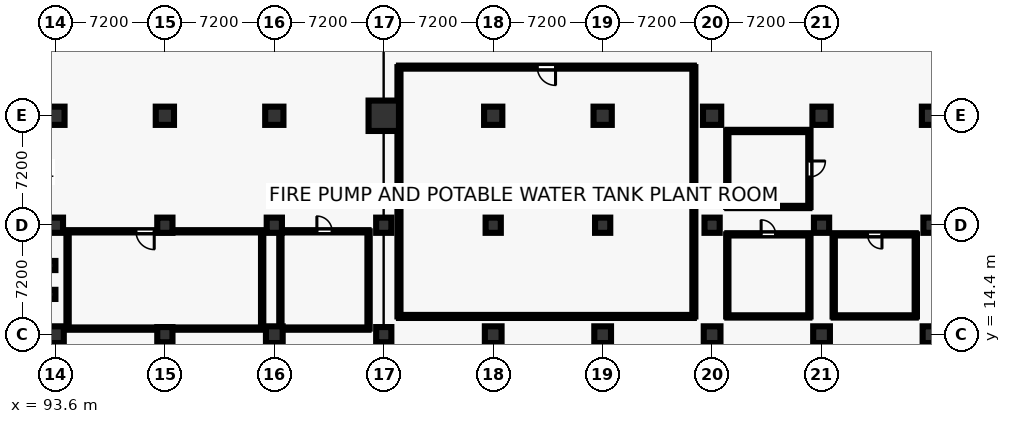
"""IFC4 building model, lengths in metres.
Left out: names, types, materials, properties, quantities, classifications, styles, units other than length and angle.
Written with IfcOpenShell. Run it as: python <this file> out.ifc"""

import sys

from ifc_helpers import new_model, si_unit, direction, frame, frame_2d, origin, origin_2d, place, context, subcontext, project, spatial, rectangle, circle, extrude, element, fill, save


model = new_model("IFC4")
c1 = context("Model", 3, precision=1e-05, world=origin(), true_north=direction((0.0, 1.0)))
c2 = subcontext(c1, "Body", "Model", "MODEL_VIEW")
j1 = project(units=[si_unit("LENGTHUNIT", "METRE"), si_unit("PLANEANGLEUNIT", "RADIAN")], contexts=[c1])
p1 = place(None, origin())
s1 = spatial("IfcSite", under=j1, at=p1, CompositionType="ELEMENT")
p2 = place(p1, origin())
s2 = spatial("IfcBuilding", under=s1, at=p2, CompositionType="ELEMENT")
p3 = place(p2, frame((0.0, 0.0, -5.4)))
s3 = spatial("IfcBuildingStorey", under=s2, at=p3, CompositionType="ELEMENT", Elevation=-5.4)
p4 = place(p3, frame((93.6, 14.4, 0.0), z_axis=(0.0, 0.0, 1.0), x_axis=(1.0, 0.0, 0.0)))
e1 = element("IfcColumn", 1, at=p4, inside=s3, PredefinedType="COLUMN", context=c2, shape_type="SweptSolid", body=[
    extrude(rectangle(XDim=1.1, YDim=1.1, at=origin_2d()), origin(), (0.0, 0.0, 1.0), 5.4),
])
p5 = place(p3, frame((93.6, 21.6, 0.0), z_axis=(0.0, 0.0, 1.0), x_axis=(1.0, 0.0, 0.0)))
e2 = element("IfcColumn", 2, at=p5, inside=s3, PredefinedType="COLUMN", context=c2, shape_type="SweptSolid", body=[
    extrude(rectangle(XDim=1.0, YDim=1.0, at=origin_2d()), origin(), (0.0, 0.0, 1.0), 5.4),
])
p6 = place(p3, frame((93.6, 28.8, 0.0), z_axis=(0.0, 0.0, 1.0), x_axis=(1.0, 0.0, 0.0)))
e3 = element("IfcColumn", 3, at=p6, inside=s3, PredefinedType="COLUMN", context=c2, shape_type="SweptSolid", body=[
    extrude(circle(Radius=0.6, at=origin_2d()), origin(), (0.0, 0.0, 1.0), 5.4),
])
p7 = place(p3, frame((100.8, 14.4, 0.0), z_axis=(0.0, 0.0, 1.0), x_axis=(1.0, 0.0, 0.0)))
e4 = element("IfcColumn", 4, at=p7, inside=s3, PredefinedType="COLUMN", context=c2, shape_type="SweptSolid", body=[
    extrude(circle(Radius=0.5, at=origin_2d()), origin(), (0.0, 0.0, 1.0), 5.4),
])
p8 = place(p3, frame((100.8, 21.6, 0.0), z_axis=(0.0, 0.0, 1.0), x_axis=(1.0, 0.0, 0.0)))
e5 = element("IfcColumn", 5, at=p8, inside=s3, PredefinedType="COLUMN", context=c2, shape_type="SweptSolid", body=[
    extrude(rectangle(XDim=1.0, YDim=1.0, at=origin_2d()), origin(), (0.0, 0.0, 1.0), 5.4),
])
p9 = place(p3, frame((100.8, 28.8, 0.0), z_axis=(0.0, 0.0, 1.0), x_axis=(1.0, 0.0, 0.0)))
e6 = element("IfcColumn", 6, at=p9, inside=s3, PredefinedType="COLUMN", context=c2, shape_type="SweptSolid", body=[
    extrude(circle(Radius=0.6, at=origin_2d()), origin(), (0.0, 0.0, 1.0), 5.4),
])
p10 = place(p3, frame((108.0, 14.4, 0.0), z_axis=(0.0, 0.0, 1.0), x_axis=(1.0, 0.0, 0.0)))
e7 = element("IfcColumn", 7, at=p10, inside=s3, PredefinedType="COLUMN", context=c2, shape_type="SweptSolid", body=[
    extrude(rectangle(XDim=1.1, YDim=1.1, at=origin_2d()), origin(), (0.0, 0.0, 1.0), 5.4),
])
p11 = place(p3, frame((108.0, 21.6, 0.0), z_axis=(0.0, 0.0, 1.0), x_axis=(1.0, 0.0, 0.0)))
e8 = element("IfcColumn", 8, at=p11, inside=s3, PredefinedType="COLUMN", context=c2, shape_type="SweptSolid", body=[
    extrude(rectangle(XDim=1.0, YDim=1.0, at=origin_2d()), origin(), (0.0, 0.0, 1.0), 5.4),
])
p12 = place(p3, frame((108.0, 28.8, 0.0), z_axis=(0.0, 0.0, 1.0), x_axis=(1.0, 0.0, 0.0)))
e9 = element("IfcColumn", 9, at=p12, inside=s3, PredefinedType="COLUMN", context=c2, shape_type="SweptSolid", body=[
    extrude(circle(Radius=0.6, at=origin_2d()), origin(), (0.0, 0.0, 1.0), 5.4),
])
for number, where, z_axis, x_axis in (
    (10, (115.2, 14.4, 0.0), (0.0, 0.0, 1.0), (1.0, 0.0, 0.0)),
    (11, (115.2, 21.6, 0.0), (0.0, 0.0, 1.0), (1.0, 0.0, 0.0)),
):
    element("IfcColumn", number, at=place(p3, frame(where, z_axis=z_axis, x_axis=x_axis)), inside=s3, PredefinedType="COLUMN", context=c2, shape_type="SweptSolid", body=[
        extrude(circle(Radius=0.5, at=origin_2d()), origin(), (0.0, 0.0, 1.0), 5.4),
    ])
p13 = place(p3, frame((115.2, 28.8, 0.0), z_axis=(0.0, 0.0, 1.0), x_axis=(1.0, 0.0, 0.0)))
e12 = element("IfcColumn", 12, at=p13, inside=s3, PredefinedType="COLUMN", context=c2, shape_type="SweptSolid", body=[
    extrude(circle(Radius=1.0, at=origin_2d()), origin(), (0.0, 0.0, 1.0), 5.4),
])
p14 = place(p3, frame((122.4, 14.4, 0.0), z_axis=(0.0, 0.0, 1.0), x_axis=(1.0, 0.0, 0.0)))
e13 = element("IfcColumn", 13, at=p14, inside=s3, PredefinedType="COLUMN", context=c2, shape_type="SweptSolid", body=[
    extrude(rectangle(XDim=1.1, YDim=1.1, at=origin_2d()), origin(), (0.0, 0.0, 1.0), 5.4),
])
p15 = place(p3, frame((122.4, 21.6, 0.0), z_axis=(0.0, 0.0, 1.0), x_axis=(1.0, 0.0, 0.0)))
e14 = element("IfcColumn", 14, at=p15, inside=s3, PredefinedType="COLUMN", context=c2, shape_type="SweptSolid", body=[
    extrude(rectangle(XDim=1.0, YDim=1.0, at=origin_2d()), origin(), (0.0, 0.0, 1.0), 5.4),
])
p16 = place(p3, frame((122.4, 28.8, 0.0), z_axis=(0.0, 0.0, 1.0), x_axis=(1.0, 0.0, 0.0)))
e15 = element("IfcColumn", 15, at=p16, inside=s3, PredefinedType="COLUMN", context=c2, shape_type="SweptSolid", body=[
    extrude(circle(Radius=0.6, at=origin_2d()), origin(), (0.0, 0.0, 1.0), 5.4),
])
p17 = place(p3, frame((129.6, 14.4, 0.0), z_axis=(0.0, 0.0, 1.0), x_axis=(1.0, 0.0, 0.0)))
e16 = element("IfcColumn", 16, at=p17, inside=s3, PredefinedType="COLUMN", context=c2, shape_type="SweptSolid", body=[
    extrude(rectangle(XDim=1.1, YDim=1.1, at=origin_2d()), origin(), (0.0, 0.0, 1.0), 5.4),
])
p18 = place(p3, frame((129.6, 21.6, 0.0), z_axis=(0.0, 0.0, 1.0), x_axis=(1.0, 0.0, 0.0)))
e17 = element("IfcColumn", 17, at=p18, inside=s3, PredefinedType="COLUMN", context=c2, shape_type="SweptSolid", body=[
    extrude(rectangle(XDim=1.0, YDim=1.0, at=origin_2d()), origin(), (0.0, 0.0, 1.0), 5.4),
])
p19 = place(p3, frame((129.6, 28.8, 0.0), z_axis=(0.0, 0.0, 1.0), x_axis=(1.0, 0.0, 0.0)))
e18 = element("IfcColumn", 18, at=p19, inside=s3, PredefinedType="COLUMN", context=c2, shape_type="SweptSolid", body=[
    extrude(circle(Radius=0.6, at=origin_2d()), origin(), (0.0, 0.0, 1.0), 5.4),
])
p20 = place(p3, frame((136.8, 14.4, 0.0), z_axis=(0.0, 0.0, 1.0), x_axis=(1.0, 0.0, 0.0)))
e19 = element("IfcColumn", 19, at=p20, inside=s3, PredefinedType="COLUMN", context=c2, shape_type="SweptSolid", body=[
    extrude(rectangle(XDim=1.1, YDim=1.1, at=origin_2d()), origin(), (0.0, 0.0, 1.0), 5.4),
])
p21 = place(p3, frame((136.8, 21.6, 0.0), z_axis=(0.0, 0.0, 1.0), x_axis=(1.0, 0.0, 0.0)))
e20 = element("IfcColumn", 20, at=p21, inside=s3, PredefinedType="COLUMN", context=c2, shape_type="SweptSolid", body=[
    extrude(rectangle(XDim=1.0, YDim=1.0, at=origin_2d()), origin(), (0.0, 0.0, 1.0), 5.4),
])
p22 = place(p3, frame((136.8, 28.8, 0.0), z_axis=(0.0, 0.0, 1.0), x_axis=(1.0, 0.0, 0.0)))
e21 = element("IfcColumn", 21, at=p22, inside=s3, PredefinedType="COLUMN", context=c2, shape_type="SweptSolid", body=[
    extrude(circle(Radius=0.6, at=origin_2d()), origin(), (0.0, 0.0, 1.0), 5.4),
])
p23 = place(p3, frame((144.0, 14.4, 0.0), z_axis=(0.0, 0.0, 1.0), x_axis=(1.0, 0.0, 0.0)))
e22 = element("IfcColumn", 22, at=p23, inside=s3, PredefinedType="COLUMN", context=c2, shape_type="SweptSolid", body=[
    extrude(rectangle(XDim=1.1, YDim=1.1, at=origin_2d()), origin(), (0.0, 0.0, 1.0), 5.4),
])
p24 = place(p3, frame((144.0, 21.6, 0.0), z_axis=(0.0, 0.0, 1.0), x_axis=(1.0, 0.0, 0.0)))
e23 = element("IfcColumn", 23, at=p24, inside=s3, PredefinedType="COLUMN", context=c2, shape_type="SweptSolid", body=[
    extrude(rectangle(XDim=1.0, YDim=1.0, at=origin_2d()), origin(), (0.0, 0.0, 1.0), 5.4),
])
p25 = place(p3, frame((144.0, 28.8, 0.0), z_axis=(0.0, 0.0, 1.0), x_axis=(1.0, 0.0, 0.0)))
e24 = element("IfcColumn", 24, at=p25, inside=s3, PredefinedType="COLUMN", context=c2, shape_type="SweptSolid", body=[
    extrude(circle(Radius=0.6, at=origin_2d()), origin(), (0.0, 0.0, 1.0), 5.4),
])
p26 = place(p3, frame((151.2, 14.4, 0.0), z_axis=(0.0, 0.0, 1.0), x_axis=(1.0, 0.0, 0.0)))
e25 = element("IfcColumn", 25, at=p26, inside=s3, PredefinedType="COLUMN", context=c2, shape_type="SweptSolid", body=[
    extrude(rectangle(XDim=1.1, YDim=1.1, at=origin_2d()), origin(), (0.0, 0.0, 1.0), 5.4),
])
p27 = place(p3, frame((151.2, 21.6, 0.0), z_axis=(0.0, 0.0, 1.0), x_axis=(1.0, 0.0, 0.0)))
e26 = element("IfcColumn", 26, at=p27, inside=s3, PredefinedType="COLUMN", context=c2, shape_type="SweptSolid", body=[
    extrude(rectangle(XDim=1.0, YDim=1.0, at=origin_2d()), origin(), (0.0, 0.0, 1.0), 5.4),
])
p28 = place(p3, frame((151.2, 28.8, 0.0), z_axis=(0.0, 0.0, 1.0), x_axis=(1.0, 0.0, 0.0)))
e27 = element("IfcColumn", 27, at=p28, inside=s3, PredefinedType="COLUMN", context=c2, shape_type="SweptSolid", body=[
    extrude(circle(Radius=0.6, at=origin_2d()), origin(), (0.0, 0.0, 1.0), 5.4),
])
for number, where, z_axis, x_axis in (
    (28, (93.3, 17.05, 0.0), (0.0, 0.0, 1.0), (1.0, 0.0, 0.0)),
    (29, (93.3, 18.95, 0.0), (0.0, 0.0, 1.0), (1.0, 0.0, 0.0)),
):
    element("IfcColumn", number, at=place(p3, frame(where, z_axis=z_axis, x_axis=x_axis)), inside=s3, PredefinedType="COLUMN", context=c2, shape_type="SweptSolid", body=[
        extrude(rectangle(XDim=0.6, YDim=0.6, at=origin_2d()), origin(), (0.0, 0.0, 1.0), 5.4),
    ])
p29 = place(p3, frame((94.4, 14.8, 0.0), z_axis=(0.0, 0.0, 1.0), x_axis=(1.0, 0.0, 0.0)))
e30 = element("IfcWall", 30, at=p29, inside=s3, PredefinedType="PARTITIONING", context=c2, shape_type="SweptSolid", body=[
    extrude(rectangle(XDim=12.8, YDim=0.15, at=frame_2d((6.4, 0.0))), origin(), (0.0, 0.0, 1.0), 4.04),
])
p30 = place(p3, frame((107.2, 14.8, 0.0), z_axis=(0.0, 0.0, 1.0), x_axis=(0.0, 1.0, 0.0)))
e31 = element("IfcWall", 31, at=p30, inside=s3, PredefinedType="PARTITIONING", context=c2, shape_type="SweptSolid", body=[
    extrude(rectangle(XDim=6.4, YDim=0.15, at=frame_2d((3.2, 0.0))), origin(), (0.0, 0.0, 1.0), 4.04),
])
p31 = place(p3, frame((107.2, 21.2, 0.0), z_axis=(0.0, 0.0, 1.0), x_axis=(-1.0, 0.0, 0.0)))
e32 = element("IfcWall", 32, at=p31, inside=s3, PredefinedType="PARTITIONING", context=c2, shape_type="SweptSolid", body=[
    extrude(rectangle(XDim=12.8, YDim=0.15, at=frame_2d((6.4, 0.0))), origin(), (0.0, 0.0, 1.0), 4.04),
])
p32 = place(p31, frame((7.1, 0.0, 0.0)))
e33 = element("IfcOpeningElement", 33, at=p32, cuts=e32, PredefinedType="OPENING", context=c2, shape_type="SweptSolid", body=[
    extrude(rectangle(XDim=1.2, YDim=2.2, at=frame_2d((0.6, 1.1))), frame((0.0, 0.085, 0.0), z_axis=(0.0, -1.0, 0.0), x_axis=(1.0, 0.0, 0.0)), (0.0, 0.0, 1.0), 0.17),
])
p33 = place(p3, frame((94.4, 21.2, 0.0), z_axis=(0.0, 0.0, 1.0), x_axis=(0.0, -1.0, 0.0)))
e34 = element("IfcWall", 34, at=p33, inside=s3, PredefinedType="PARTITIONING", context=c2, shape_type="SweptSolid", body=[
    extrude(rectangle(XDim=6.4, YDim=0.15, at=frame_2d((3.2, 0.0))), origin(), (0.0, 0.0, 1.0), 4.04),
])
p34 = place(p3, frame((108.4, 14.8, 0.0), z_axis=(0.0, 0.0, 1.0), x_axis=(1.0, 0.0, 0.0)))
e35 = element("IfcWall", 35, at=p34, inside=s3, PredefinedType="PARTITIONING", context=c2, shape_type="SweptSolid", body=[
    extrude(rectangle(XDim=5.8, YDim=0.15, at=frame_2d((2.9, 0.0))), origin(), (0.0, 0.0, 1.0), 4.04),
])
p35 = place(p3, frame((114.2, 14.8, 0.0), z_axis=(0.0, 0.0, 1.0), x_axis=(0.0, 1.0, 0.0)))
e36 = element("IfcWall", 36, at=p35, inside=s3, PredefinedType="PARTITIONING", context=c2, shape_type="SweptSolid", body=[
    extrude(rectangle(XDim=6.4, YDim=0.15, at=frame_2d((3.2, 0.0))), origin(), (0.0, 0.0, 1.0), 4.04),
])
p36 = place(p3, frame((114.2, 21.2, 0.0), z_axis=(0.0, 0.0, 1.0), x_axis=(-1.0, 0.0, 0.0)))
e37 = element("IfcWall", 37, at=p36, inside=s3, PredefinedType="PARTITIONING", context=c2, shape_type="SweptSolid", body=[
    extrude(rectangle(XDim=5.8, YDim=0.15, at=frame_2d((2.9, 0.0))), origin(), (0.0, 0.0, 1.0), 4.04),
])
p37 = place(p36, frame((2.4, 0.0, 0.0)))
e38 = element("IfcOpeningElement", 38, at=p37, cuts=e37, PredefinedType="OPENING", context=c2, shape_type="SweptSolid", body=[
    extrude(rectangle(XDim=1.0, YDim=2.2, at=frame_2d((0.5, 1.1))), frame((0.0, 0.085, 0.0), z_axis=(0.0, -1.0, 0.0), x_axis=(1.0, 0.0, 0.0)), (0.0, 0.0, 1.0), 0.17),
])
p38 = place(p3, frame((108.4, 21.2, 0.0), z_axis=(0.0, 0.0, 1.0), x_axis=(0.0, -1.0, 0.0)))
e39 = element("IfcWall", 39, at=p38, inside=s3, PredefinedType="PARTITIONING", context=c2, shape_type="SweptSolid", body=[
    extrude(rectangle(XDim=6.4, YDim=0.15, at=frame_2d((3.2, 0.0))), origin(), (0.0, 0.0, 1.0), 4.04),
])
p39 = place(p3, frame((116.2, 15.6, 0.0), z_axis=(0.0, 0.0, 1.0), x_axis=(1.0, 0.0, 0.0)))
e40 = element("IfcWall", 40, at=p39, inside=s3, PredefinedType="PARTITIONING", context=c2, shape_type="SweptSolid", body=[
    extrude(rectangle(XDim=19.4, YDim=0.2, at=frame_2d((9.7, 0.0))), origin(), (0.0, 0.0, 1.0), 4.04),
])
p40 = place(p3, frame((135.6, 15.6, 0.0), z_axis=(0.0, 0.0, 1.0), x_axis=(0.0, 1.0, 0.0)))
e41 = element("IfcWall", 41, at=p40, inside=s3, PredefinedType="PARTITIONING", context=c2, shape_type="SweptSolid", body=[
    extrude(rectangle(XDim=16.4, YDim=0.2, at=frame_2d((8.2, 0.0))), origin(), (0.0, 0.0, 1.0), 4.04),
])
p41 = place(p3, frame((135.6, 32.0, 0.0), z_axis=(0.0, 0.0, 1.0), x_axis=(-1.0, 0.0, 0.0)))
e42 = element("IfcWall", 42, at=p41, inside=s3, PredefinedType="PARTITIONING", context=c2, shape_type="SweptSolid", body=[
    extrude(rectangle(XDim=19.4, YDim=0.2, at=frame_2d((9.7, 0.0))), origin(), (0.0, 0.0, 1.0), 4.04),
])
p42 = place(p41, frame((9.1, 0.0, 0.0)))
e43 = element("IfcOpeningElement", 43, at=p42, cuts=e42, PredefinedType="OPENING", context=c2, shape_type="SweptSolid", body=[
    extrude(rectangle(XDim=1.2, YDim=2.25, at=frame_2d((0.6, 1.125))), frame((0.0, 0.11, 0.0), z_axis=(0.0, -1.0, 0.0), x_axis=(1.0, 0.0, 0.0)), (0.0, 0.0, 1.0), 0.22),
])
p43 = place(p3, frame((116.2, 32.0, 0.0), z_axis=(0.0, 0.0, 1.0), x_axis=(0.0, -1.0, 0.0)))
e44 = element("IfcWall", 44, at=p43, inside=s3, PredefinedType="PARTITIONING", context=c2, shape_type="SweptSolid", body=[
    extrude(rectangle(XDim=16.4, YDim=0.2, at=frame_2d((8.2, 0.0))), origin(), (0.0, 0.0, 1.0), 4.04),
])
for number, where, z_axis, x_axis in (
    (45, (137.8, 15.6, 0.0), (0.0, 0.0, 1.0), (1.0, 0.0, 0.0)),
    (46, (143.2, 15.6, 0.0), (0.0, 0.0, 1.0), (0.0, 1.0, 0.0)),
):
    element("IfcWall", number, at=place(p3, frame(where, z_axis=z_axis, x_axis=x_axis)), inside=s3, PredefinedType="PARTITIONING", context=c2, shape_type="SweptSolid", body=[
        extrude(rectangle(XDim=5.4, YDim=0.15, at=frame_2d((2.7, 0.0))), origin(), (0.0, 0.0, 1.0), 4.04),
    ])
p44 = place(p3, frame((143.2, 21.0, 0.0), z_axis=(0.0, 0.0, 1.0), x_axis=(-1.0, 0.0, 0.0)))
e47 = element("IfcWall", 47, at=p44, inside=s3, PredefinedType="PARTITIONING", context=c2, shape_type="SweptSolid", body=[
    extrude(rectangle(XDim=5.4, YDim=0.15, at=frame_2d((2.7, 0.0))), origin(), (0.0, 0.0, 1.0), 4.04),
])
p45 = place(p44, frame((2.225, 0.0, 0.0)))
e48 = element("IfcOpeningElement", 48, at=p45, cuts=e47, PredefinedType="OPENING", context=c2, shape_type="SweptSolid", body=[
    extrude(rectangle(XDim=0.95, YDim=2.15, at=frame_2d((0.475, 1.075))), frame((0.0, 0.085, 0.0), z_axis=(0.0, -1.0, 0.0), x_axis=(1.0, 0.0, 0.0)), (0.0, 0.0, 1.0), 0.17),
])
for number, where, z_axis, x_axis in (
    (49, (137.8, 21.0, 0.0), (0.0, 0.0, 1.0), (0.0, -1.0, 0.0)),
    (50, (144.8, 15.6, 0.0), (0.0, 0.0, 1.0), (1.0, 0.0, 0.0)),
    (51, (150.2, 15.6, 0.0), (0.0, 0.0, 1.0), (0.0, 1.0, 0.0)),
):
    element("IfcWall", number, at=place(p3, frame(where, z_axis=z_axis, x_axis=x_axis)), inside=s3, PredefinedType="PARTITIONING", context=c2, shape_type="SweptSolid", body=[
        extrude(rectangle(XDim=5.4, YDim=0.15, at=frame_2d((2.7, 0.0))), origin(), (0.0, 0.0, 1.0), 4.04),
    ])
p46 = place(p3, frame((150.2, 21.0, 0.0), z_axis=(0.0, 0.0, 1.0), x_axis=(-1.0, 0.0, 0.0)))
e52 = element("IfcWall", 52, at=p46, inside=s3, PredefinedType="PARTITIONING", context=c2, shape_type="SweptSolid", body=[
    extrude(rectangle(XDim=5.4, YDim=0.15, at=frame_2d((2.7, 0.0))), origin(), (0.0, 0.0, 1.0), 4.04),
])
p47 = place(p46, frame((2.225, 0.0, 0.0)))
e53 = element("IfcOpeningElement", 53, at=p47, cuts=e52, PredefinedType="OPENING", context=c2, shape_type="SweptSolid", body=[
    extrude(rectangle(XDim=0.95, YDim=2.15, at=frame_2d((0.475, 1.075))), frame((0.0, 0.085, 0.0), z_axis=(0.0, -1.0, 0.0), x_axis=(1.0, 0.0, 0.0)), (0.0, 0.0, 1.0), 0.17),
])
for number, where, z_axis, x_axis in (
    (54, (144.8, 21.0, 0.0), (0.0, 0.0, 1.0), (0.0, -1.0, 0.0)),
    (55, (137.8, 22.8, 0.0), (0.0, 0.0, 1.0), (1.0, 0.0, 0.0)),
):
    element("IfcWall", number, at=place(p3, frame(where, z_axis=z_axis, x_axis=x_axis)), inside=s3, PredefinedType="PARTITIONING", context=c2, shape_type="SweptSolid", body=[
        extrude(rectangle(XDim=5.4, YDim=0.15, at=frame_2d((2.7, 0.0))), origin(), (0.0, 0.0, 1.0), 4.04),
    ])
p48 = place(p3, frame((143.2, 22.8, 0.0), z_axis=(0.0, 0.0, 1.0), x_axis=(0.0, 1.0, 0.0)))
e56 = element("IfcWall", 56, at=p48, inside=s3, PredefinedType="PARTITIONING", context=c2, shape_type="SweptSolid", body=[
    extrude(rectangle(XDim=5.0, YDim=0.15, at=frame_2d((2.5, 0.0))), origin(), (0.0, 0.0, 1.0), 4.04),
])
p49 = place(p48, frame((1.975, 0.0, 0.0)))
e57 = element("IfcOpeningElement", 57, at=p49, cuts=e56, PredefinedType="OPENING", context=c2, shape_type="SweptSolid", body=[
    extrude(rectangle(XDim=1.05, YDim=2.2, at=frame_2d((0.525, 1.1))), frame((0.0, 0.085, 0.0), z_axis=(0.0, -1.0, 0.0), x_axis=(1.0, 0.0, 0.0)), (0.0, 0.0, 1.0), 0.17),
])
p50 = place(p3, frame((143.2, 27.8, 0.0), z_axis=(0.0, 0.0, 1.0), x_axis=(-1.0, 0.0, 0.0)))
e58 = element("IfcWall", 58, at=p50, inside=s3, PredefinedType="PARTITIONING", context=c2, shape_type="SweptSolid", body=[
    extrude(rectangle(XDim=5.4, YDim=0.15, at=frame_2d((2.7, 0.0))), origin(), (0.0, 0.0, 1.0), 4.04),
])
p51 = place(p3, frame((137.8, 27.8, 0.0), z_axis=(0.0, 0.0, 1.0), x_axis=(0.0, -1.0, 0.0)))
e59 = element("IfcWall", 59, at=p51, inside=s3, PredefinedType="PARTITIONING", context=c2, shape_type="SweptSolid", body=[
    extrude(rectangle(XDim=5.0, YDim=0.15, at=frame_2d((2.5, 0.0))), origin(), (0.0, 0.0, 1.0), 4.04),
])
p52 = place(p32, origin())
e60 = element("IfcDoor", 60, at=p52, inside=s3, OperationType="SINGLE_SWING_LEFT", PredefinedType="DOOR", context=c2, shape_type="SweptSolid", body=[
    extrude(rectangle(XDim=1.2, YDim=2.2, at=frame_2d((0.6, 1.1))), frame((0.0, 0.025, 0.0), z_axis=(0.0, -1.0, 0.0), x_axis=(1.0, 0.0, 0.0)), (0.0, 0.0, 1.0), 0.05),
])
fill(e33, e60)
p53 = place(p37, frame((1.0, 0.0, 0.0), z_axis=(0.0, 0.0, 1.0), x_axis=(-1.0, 0.0, 0.0)))
e61 = element("IfcDoor", 61, at=p53, inside=s3, OperationType="SINGLE_SWING_RIGHT", PredefinedType="DOOR", context=c2, shape_type="SweptSolid", body=[
    extrude(rectangle(XDim=1.0, YDim=2.2, at=frame_2d((0.5, 1.1))), frame((0.0, 0.025, 0.0), z_axis=(0.0, -1.0, 0.0), x_axis=(1.0, 0.0, 0.0)), (0.0, 0.0, 1.0), 0.05),
])
fill(e38, e61)
p54 = place(p42, origin())
e62 = element("IfcDoor", 62, at=p54, inside=s3, OperationType="SINGLE_SWING_LEFT", PredefinedType="DOOR", context=c2, shape_type="SweptSolid", body=[
    extrude(rectangle(XDim=1.2, YDim=2.25, at=frame_2d((0.6, 1.125))), frame((0.0, 0.025, 0.0), z_axis=(0.0, -1.0, 0.0), x_axis=(1.0, 0.0, 0.0)), (0.0, 0.0, 1.0), 0.05),
])
fill(e43, e62)
p55 = place(p45, frame((0.95, 0.0, 0.0), z_axis=(0.0, 0.0, 1.0), x_axis=(-1.0, 0.0, 0.0)))
e63 = element("IfcDoor", 63, at=p55, inside=s3, OperationType="SINGLE_SWING_RIGHT", PredefinedType="DOOR", context=c2, shape_type="SweptSolid", body=[
    extrude(rectangle(XDim=0.95, YDim=2.15, at=frame_2d((0.475, 1.075))), frame((0.0, 0.025, 0.0), z_axis=(0.0, -1.0, 0.0), x_axis=(1.0, 0.0, 0.0)), (0.0, 0.0, 1.0), 0.05),
])
fill(e48, e63)
p56 = place(p47, origin())
e64 = element("IfcDoor", 64, at=p56, inside=s3, OperationType="SINGLE_SWING_LEFT", PredefinedType="DOOR", context=c2, shape_type="SweptSolid", body=[
    extrude(rectangle(XDim=0.95, YDim=2.15, at=frame_2d((0.475, 1.075))), frame((0.0, 0.025, 0.0), z_axis=(0.0, -1.0, 0.0), x_axis=(1.0, 0.0, 0.0)), (0.0, 0.0, 1.0), 0.05),
])
fill(e53, e64)
p57 = place(p49, frame((1.05, 0.0, 0.0), z_axis=(0.0, 0.0, 1.0), x_axis=(-1.0, 0.0, 0.0)))
e65 = element("IfcDoor", 65, at=p57, inside=s3, OperationType="SINGLE_SWING_RIGHT", PredefinedType="DOOR", context=c2, shape_type="SweptSolid", body=[
    extrude(rectangle(XDim=1.05, YDim=2.2, at=frame_2d((0.525, 1.1))), frame((0.0, 0.025, 0.0), z_axis=(0.0, -1.0, 0.0), x_axis=(1.0, 0.0, 0.0)), (0.0, 0.0, 1.0), 0.05),
])
fill(e57, e65)
save(model, sys.argv[1])
